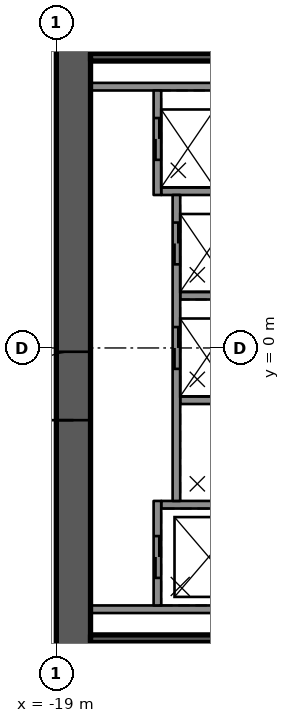
"""IFC4 building model, lengths in metres.
Left out: names, types, materials, properties, quantities, classifications, styles, units other than length and angle.
Written with IfcOpenShell. Run it as: python <this file> out.ifc"""

import sys

from ifc_helpers import new_model, si_unit, direction, frame, frame_2d, origin, place, context, subcontext, project, spatial, rectangle, extrude, element, fill, save


model = new_model("IFC4")
c1 = context("Model", 3, precision=1e-05, world=origin(), true_north=direction((0.0, 1.0)))
c2 = subcontext(c1, "Body", "Model", "MODEL_VIEW")
j1 = project(units=[si_unit("LENGTHUNIT", "METRE"), si_unit("PLANEANGLEUNIT", "RADIAN")], contexts=[c1])
p1 = place(None, origin())
s1 = spatial("IfcSite", under=j1, at=p1, CompositionType="ELEMENT")
p2 = place(p1, origin())
s2 = spatial("IfcBuilding", under=s1, at=p2, CompositionType="ELEMENT")
p3 = place(p2, frame((0.0, 0.0, 25.1)))
s3 = spatial("IfcBuildingStorey", under=s2, at=p3, CompositionType="ELEMENT", Elevation=25.1)
p4 = place(p3, frame((-18.55, -12.0, 0.0), z_axis=(0.0, 0.0, 1.0), x_axis=(0.0, 1.0, 0.0)))
e1 = element("IfcWall", 1, at=p4, inside=s3, PredefinedType="SHEAR", context=c2, shape_type="SweptSolid", body=[
    extrude(rectangle(XDim=24.0, YDim=0.9, at=frame_2d((12.0, 0.0))), origin(), (0.0, 0.0, 1.0), 4.1),
])
p5 = place(p4, frame((10.1, 0.0, 0.0)))
e2 = element("IfcOpeningElement", 2, at=p5, cuts=e1, PredefinedType="OPENING", context=c2, shape_type="SweptSolid", body=[
    extrude(rectangle(XDim=1.8, YDim=2.1, at=frame_2d((0.9, 1.05))), frame((0.0, 0.46, 0.0), z_axis=(0.0, -1.0, 0.0), x_axis=(1.0, 0.0, 0.0)), (0.0, 0.0, 1.0), 0.92),
])
for number, where, z_axis, x_axis in (
    (3, (-11.54, 6.875, 0.0), (0.0, 0.0, 1.0), (-1.0, 0.0, 0.0)),
    (4, (-11.54, -6.875, 0.0), (0.0, 0.0, 1.0), (-1.0, 0.0, 0.0)),
):
    element("IfcWall", number, at=place(p3, frame(where, z_axis=z_axis, x_axis=x_axis)), inside=s3, PredefinedType="SOLIDWALL", context=c2, shape_type="SweptSolid", body=[
        extrude(rectangle(XDim=6.56, YDim=0.2, at=frame_2d((3.28, 0.0))), origin(), (0.0, 0.0, 1.0), 3.69),
    ])
p6 = place(p3, frame((-11.54, -4.125, 0.0), z_axis=(0.0, 0.0, 1.0), x_axis=(-1.0, 0.0, 0.0)))
e5 = element("IfcWall", 5, at=p6, inside=s3, PredefinedType="SOLIDWALL", context=c2, shape_type="SweptSolid", body=[
    extrude(rectangle(XDim=4.7, YDim=0.2, at=frame_2d((2.35, 0.0))), origin(), (0.0, 0.0, 1.0), 3.69),
])
for number, where, z_axis, x_axis in (
    (6, (-11.54, -1.375, 0.0), (0.0, 0.0, 1.0), (-1.0, 0.0, 0.0)),
    (7, (-11.54, 1.375, 0.0), (0.0, 0.0, 1.0), (-1.0, 0.0, 0.0)),
):
    element("IfcWall", number, at=place(p3, frame(where, z_axis=z_axis, x_axis=x_axis)), inside=s3, PredefinedType="SOLIDWALL", context=c2, shape_type="SweptSolid", body=[
        extrude(rectangle(XDim=4.2, YDim=0.2, at=frame_2d((2.1, 0.0))), origin(), (0.0, 0.0, 1.0), 3.69),
    ])
p7 = place(p3, frame((-11.54, 4.125, 0.0), z_axis=(0.0, 0.0, 1.0), x_axis=(-1.0, 0.0, 0.0)))
e8 = element("IfcWall", 8, at=p7, inside=s3, PredefinedType="SOLIDWALL", context=c2, shape_type="SweptSolid", body=[
    extrude(rectangle(XDim=4.7, YDim=0.2, at=frame_2d((2.35, 0.0))), origin(), (0.0, 0.0, 1.0), 3.69),
])
p8 = place(p3, frame((-16.34, -6.775, 0.0), z_axis=(0.0, 0.0, 1.0), x_axis=(0.0, 1.0, 0.0)))
e9 = element("IfcWall", 9, at=p8, inside=s3, PredefinedType="SOLIDWALL", context=c2, shape_type="SweptSolid", body=[
    extrude(rectangle(XDim=2.75, YDim=0.2, at=frame_2d((1.375, 0.0))), origin(), (0.0, 0.0, 1.0), 3.69),
])
p9 = place(p8, frame((0.725, 0.0, 0.0)))
e10 = element("IfcOpeningElement", 10, at=p9, cuts=e9, PredefinedType="OPENING", context=c2, shape_type="SweptSolid", body=[
    extrude(rectangle(XDim=1.1, YDim=2.1, at=frame_2d((0.55, 1.05))), frame((0.0, 0.11, 0.0), z_axis=(0.0, -1.0, 0.0), x_axis=(1.0, 0.0, 0.0)), (0.0, 0.0, 1.0), 0.22),
])
p10 = place(p3, frame((-15.84, -4.025, 0.0), z_axis=(0.0, 0.0, 1.0), x_axis=(0.0, 1.0, 0.0)))
e11 = element("IfcWall", 11, at=p10, inside=s3, PredefinedType="SOLIDWALL", context=c2, shape_type="SweptSolid", body=[
    extrude(rectangle(XDim=8.05, YDim=0.2, at=frame_2d((4.025, 0.0))), origin(), (0.0, 0.0, 1.0), 3.69),
])
p11 = place(p10, frame((3.475, 0.0, 0.0)))
e12 = element("IfcOpeningElement", 12, at=p11, cuts=e11, PredefinedType="OPENING", context=c2, shape_type="SweptSolid", body=[
    extrude(rectangle(XDim=1.1, YDim=2.1, at=frame_2d((0.55, 1.05))), frame((0.0, 0.11, 0.0), z_axis=(0.0, -1.0, 0.0), x_axis=(1.0, 0.0, 0.0)), (0.0, 0.0, 1.0), 0.22),
])
p12 = place(p10, frame((6.225, 0.0, 0.0)))
e13 = element("IfcOpeningElement", 13, at=p12, cuts=e11, PredefinedType="OPENING", context=c2, shape_type="SweptSolid", body=[
    extrude(rectangle(XDim=1.1, YDim=2.1, at=frame_2d((0.55, 1.05))), frame((0.0, 0.11, 0.0), z_axis=(0.0, -1.0, 0.0), x_axis=(1.0, 0.0, 0.0)), (0.0, 0.0, 1.0), 0.22),
])
p13 = place(p3, frame((-16.34, 4.025, 0.0), z_axis=(0.0, 0.0, 1.0), x_axis=(0.0, 1.0, 0.0)))
e14 = element("IfcWall", 14, at=p13, inside=s3, PredefinedType="SOLIDWALL", context=c2, shape_type="SweptSolid", body=[
    extrude(rectangle(XDim=2.75, YDim=0.2, at=frame_2d((1.375, 0.0))), origin(), (0.0, 0.0, 1.0), 3.69),
])
p14 = place(p13, frame((0.925, 0.0, 0.0)))
e15 = element("IfcOpeningElement", 15, at=p14, cuts=e14, PredefinedType="OPENING", context=c2, shape_type="SweptSolid", body=[
    extrude(rectangle(XDim=1.1, YDim=2.1, at=frame_2d((0.55, 1.05))), frame((0.0, 0.11, 0.0), z_axis=(0.0, -1.0, 0.0), x_axis=(1.0, 0.0, 0.0)), (0.0, 0.0, 1.0), 0.22),
])
for number, where, z_axis, x_axis in (
    (16, (-11.54, 7.65, 0.0), (0.0, 0.0, 1.0), (-1.0, 0.0, 0.0)),
    (17, (-11.54, -7.65, 0.0), (0.0, 0.0, 1.0), (-1.0, 0.0, 0.0)),
):
    element("IfcWall", number, at=place(p3, frame(where, z_axis=z_axis, x_axis=x_axis)), inside=s3, PredefinedType="SOLIDWALL", context=c2, shape_type="SweptSolid", body=[
        extrude(rectangle(XDim=6.56, YDim=0.2, at=frame_2d((3.28, 0.0))), origin(), (0.0, 0.0, 1.0), 3.69),
    ])
p15 = place(p9, origin())
e18 = element("IfcDoor", 18, at=p15, inside=s3, OperationType="DOUBLE_DOOR_SLIDING", PredefinedType="DOOR", context=c2, shape_type="SweptSolid", body=[
    extrude(rectangle(XDim=1.1, YDim=2.1, at=frame_2d((0.55, 1.05))), frame((0.0, 0.025, 0.0), z_axis=(0.0, -1.0, 0.0), x_axis=(1.0, 0.0, 0.0)), (0.0, 0.0, 1.0), 0.05),
])
fill(e10, e18)
p16 = place(p11, origin())
e19 = element("IfcDoor", 19, at=p16, inside=s3, OperationType="DOUBLE_DOOR_SLIDING", PredefinedType="DOOR", context=c2, shape_type="SweptSolid", body=[
    extrude(rectangle(XDim=1.1, YDim=2.1, at=frame_2d((0.55, 1.05))), frame((0.0, 0.025, 0.0), z_axis=(0.0, -1.0, 0.0), x_axis=(1.0, 0.0, 0.0)), (0.0, 0.0, 1.0), 0.05),
])
fill(e12, e19)
p17 = place(p12, origin())
e20 = element("IfcDoor", 20, at=p17, inside=s3, OperationType="DOUBLE_DOOR_SLIDING", PredefinedType="DOOR", context=c2, shape_type="SweptSolid", body=[
    extrude(rectangle(XDim=1.1, YDim=2.1, at=frame_2d((0.55, 1.05))), frame((0.0, 0.025, 0.0), z_axis=(0.0, -1.0, 0.0), x_axis=(1.0, 0.0, 0.0)), (0.0, 0.0, 1.0), 0.05),
])
fill(e13, e20)
p18 = place(p14, origin())
e21 = element("IfcDoor", 21, at=p18, inside=s3, OperationType="DOUBLE_DOOR_SLIDING", PredefinedType="DOOR", context=c2, shape_type="SweptSolid", body=[
    extrude(rectangle(XDim=1.1, YDim=2.1, at=frame_2d((0.55, 1.05))), frame((0.0, 0.025, 0.0), z_axis=(0.0, -1.0, 0.0), x_axis=(1.0, 0.0, 0.0)), (0.0, 0.0, 1.0), 0.05),
])
fill(e15, e21)
p19 = place(p5, origin())
e22 = element("IfcDoor", 22, at=p19, inside=s3, OperationType="SINGLE_SWING_LEFT", PredefinedType="DOOR", context=c2, shape_type="SweptSolid", body=[
    extrude(rectangle(XDim=1.8, YDim=2.1, at=frame_2d((0.9, 1.05))), frame((0.0, 0.025, 0.0), z_axis=(0.0, -1.0, 0.0), x_axis=(1.0, 0.0, 0.0)), (0.0, 0.0, 1.0), 0.05),
])
fill(e2, e22)
save(model, sys.argv[1])
